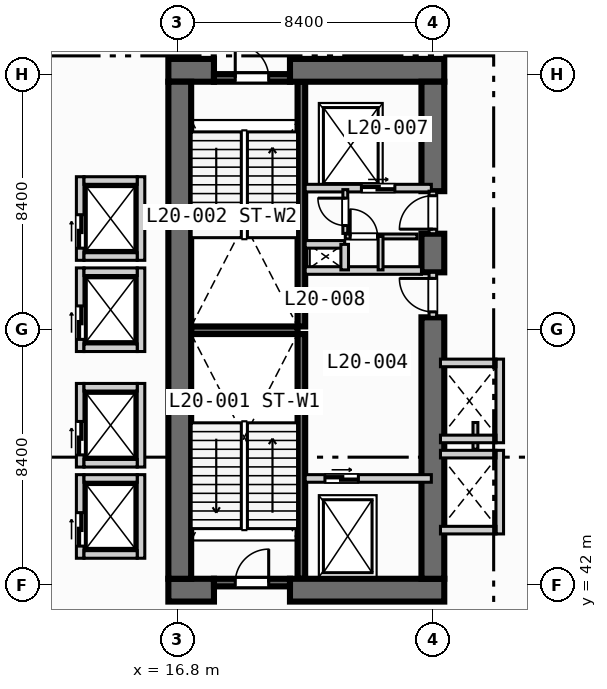
"""IFC4 building model, lengths in metres.
Left out: names, types, materials, properties, quantities, classifications, styles, units other than length and angle.
Written with IfcOpenShell. Run it as: python <this file> out.ifc"""

import sys

from ifc_helpers import new_model, si_unit, direction, frame, frame_2d, origin, place, context, subcontext, project, spatial, rectangle, extrude, element, fill, save


model = new_model("IFC4")
c1 = context("Model", 3, precision=1e-05, world=origin(), true_north=direction((0.0, 1.0)))
c2 = subcontext(c1, "Body", "Model", "MODEL_VIEW")
j1 = project(units=[si_unit("LENGTHUNIT", "METRE"), si_unit("PLANEANGLEUNIT", "RADIAN")], contexts=[c1])
p1 = place(None, origin())
s1 = spatial("IfcSite", under=j1, at=p1, CompositionType="ELEMENT")
p2 = place(p1, origin())
s2 = spatial("IfcBuilding", under=s1, at=p2, CompositionType="ELEMENT")
p3 = place(p2, frame((0.0, 0.0, 85.2)))
s3 = spatial("IfcBuildingStorey", under=s2, at=p3, CompositionType="ELEMENT", Elevation=85.2)
for number, where, z_axis, x_axis in (
    (1, (20.875, 42.2, 0.0), (0.0, 0.0, 1.0), (0.0, 1.0, 0.0)),
    (2, (20.875, 50.5, 0.0), (0.0, 0.0, 1.0), (0.0, 1.0, 0.0)),
):
    element("IfcWall", number, at=place(p3, frame(where, z_axis=z_axis, x_axis=x_axis)), inside=s3, PredefinedType="SOLIDWALL", context=c2, shape_type="SweptSolid", body=[
        extrude(rectangle(XDim=8.05, YDim=0.25, at=frame_2d((4.025, 0.0))), origin(), (0.0, 0.0, 1.0), 4.15),
    ])
p4 = place(p3, frame((17.25, 50.375, 0.0), z_axis=(0.0, 0.0, 1.0), x_axis=(1.0, 0.0, 0.0)))
e3 = element("IfcWall", 3, at=p4, inside=s3, PredefinedType="SOLIDWALL", context=c2, shape_type="SweptSolid", body=[
    extrude(rectangle(XDim=3.5, YDim=0.25, at=frame_2d((1.75, 0.0))), origin(), (0.0, 0.0, 1.0), 4.15),
])
p5 = place(p3, frame((16.5, 41.825, 0.0), z_axis=(0.0, 0.0, 1.0), x_axis=(1.0, 0.0, 0.0)))
e4 = element("IfcWall", 4, at=p5, inside=s3, PredefinedType="SHEAR", context=c2, shape_type="SweptSolid", body=[
    extrude(rectangle(XDim=1.5, YDim=0.75, at=frame_2d((0.75, 0.0))), origin(), (0.0, 0.0, 1.0), 4.15),
])
p6 = place(p3, frame((20.5, 41.825, 0.0), z_axis=(0.0, 0.0, 1.0), x_axis=(1.0, 0.0, 0.0)))
e5 = element("IfcWall", 5, at=p6, inside=s3, PredefinedType="SHEAR", context=c2, shape_type="SweptSolid", body=[
    extrude(rectangle(XDim=5.075, YDim=0.75, at=frame_2d((2.538, 0.0))), origin(), (0.0, 0.0, 1.0), 4.15),
])
p7 = place(p3, frame((16.5, 58.925, 0.0), z_axis=(0.0, 0.0, 1.0), x_axis=(1.0, 0.0, 0.0)))
e6 = element("IfcWall", 6, at=p7, inside=s3, PredefinedType="SHEAR", context=c2, shape_type="SweptSolid", body=[
    extrude(rectangle(XDim=1.5, YDim=0.75, at=frame_2d((0.75, 0.0))), origin(), (0.0, 0.0, 1.0), 4.15),
])
p8 = place(p3, frame((20.5, 58.925, 0.0), z_axis=(0.0, 0.0, 1.0), x_axis=(1.0, 0.0, 0.0)))
e7 = element("IfcWall", 7, at=p8, inside=s3, PredefinedType="SHEAR", context=c2, shape_type="SweptSolid", body=[
    extrude(rectangle(XDim=5.075, YDim=0.75, at=frame_2d((2.538, 0.0))), origin(), (0.0, 0.0, 1.0), 4.15),
])
p9 = place(p3, frame((16.875, 42.2, 0.0), z_axis=(0.0, 0.0, 1.0), x_axis=(0.0, 1.0, 0.0)))
e8 = element("IfcWall", 8, at=p9, inside=s3, PredefinedType="SHEAR", context=c2, shape_type="SweptSolid", body=[
    extrude(rectangle(XDim=16.35, YDim=0.75, at=frame_2d((8.175, 0.0))), origin(), (0.0, 0.0, 1.0), 4.15),
])
p10 = place(p3, frame((25.2, 42.2, 0.0), z_axis=(0.0, 0.0, 1.0), x_axis=(0.0, 1.0, 0.0)))
e9 = element("IfcWall", 9, at=p10, inside=s3, PredefinedType="SHEAR", context=c2, shape_type="SweptSolid", body=[
    extrude(rectangle(XDim=8.6, YDim=0.75, at=frame_2d((4.3, 0.0))), origin(), (0.0, 0.0, 1.0), 4.15),
])
p11 = place(p3, frame((25.2, 52.28, 0.0), z_axis=(0.0, 0.0, 1.0), x_axis=(0.0, 1.0, 0.0)))
e10 = element("IfcWall", 10, at=p11, inside=s3, PredefinedType="SHEAR", context=c2, shape_type="SweptSolid", body=[
    extrude(rectangle(XDim=1.27, YDim=0.75, at=frame_2d((0.635, 0.0))), origin(), (0.0, 0.0, 1.0), 4.15),
])
p12 = place(p3, frame((25.2, 54.95, 0.0), z_axis=(0.0, 0.0, 1.0), x_axis=(0.0, 1.0, 0.0)))
e11 = element("IfcWall", 11, at=p12, inside=s3, PredefinedType="SHEAR", context=c2, shape_type="SweptSolid", body=[
    extrude(rectangle(XDim=3.6, YDim=0.75, at=frame_2d((1.8, 0.0))), origin(), (0.0, 0.0, 1.0), 4.15),
])
p13 = place(p3, frame((18.0, 42.075, 0.0), z_axis=(0.0, 0.0, 1.0), x_axis=(1.0, 0.0, 0.0)))
e12 = element("IfcWall", 12, at=p13, inside=s3, PredefinedType="SOLIDWALL", context=c2, shape_type="SweptSolid", body=[
    extrude(rectangle(XDim=2.5, YDim=0.25, at=frame_2d((1.25, 0.0))), origin(), (0.0, 0.0, 1.0), 4.15),
])
p14 = place(p13, frame((0.7, 0.0, 0.0)))
e13 = element("IfcOpeningElement", 13, at=p14, cuts=e12, PredefinedType="OPENING", context=c2, shape_type="SweptSolid", body=[
    extrude(rectangle(XDim=1.1, YDim=2.15, at=frame_2d((0.55, 1.075))), frame((0.0, 0.135, 0.0), z_axis=(0.0, -1.0, 0.0), x_axis=(1.0, 0.0, 0.0)), (0.0, 0.0, 1.0), 0.27),
])
p15 = place(p3, frame((18.0, 58.675, 0.0), z_axis=(0.0, 0.0, 1.0), x_axis=(1.0, 0.0, 0.0)))
e14 = element("IfcWall", 14, at=p15, inside=s3, PredefinedType="SOLIDWALL", context=c2, shape_type="SweptSolid", body=[
    extrude(rectangle(XDim=2.5, YDim=0.25, at=frame_2d((1.25, 0.0))), origin(), (0.0, 0.0, 1.0), 4.15),
])
p16 = place(p15, frame((0.7, 0.0, 0.0)))
e15 = element("IfcOpeningElement", 15, at=p16, cuts=e14, PredefinedType="OPENING", context=c2, shape_type="SweptSolid", body=[
    extrude(rectangle(XDim=1.1, YDim=2.15, at=frame_2d((0.55, 1.075))), frame((0.0, 0.135, 0.0), z_axis=(0.0, -1.0, 0.0), x_axis=(1.0, 0.0, 0.0)), (0.0, 0.0, 1.0), 0.27),
])
p17 = place(p3, frame((21.0, 45.5, 0.0), z_axis=(0.0, 0.0, 1.0), x_axis=(1.0, 0.0, 0.0)))
e16 = element("IfcWall", 16, at=p17, inside=s3, PredefinedType="SOLIDWALL", context=c2, shape_type="SweptSolid", body=[
    extrude(rectangle(XDim=4.15, YDim=0.25, at=frame_2d((2.075, 0.0))), origin(), (0.0, 0.0, 1.0), 4.15),
])
p18 = place(p17, frame((0.65, 0.0, 0.0)))
e17 = element("IfcOpeningElement", 17, at=p18, cuts=e16, PredefinedType="OPENING", context=c2, shape_type="SweptSolid", body=[
    extrude(rectangle(XDim=1.1, YDim=2.15, at=frame_2d((0.55, 1.075))), frame((0.0, 0.135, 0.0), z_axis=(0.0, -1.0, 0.0), x_axis=(1.0, 0.0, 0.0)), (0.0, 0.0, 1.0), 0.27),
])
p19 = place(p3, frame((25.2, 50.8, 0.0), z_axis=(0.0, 0.0, 1.0), x_axis=(0.0, 1.0, 0.0)))
e18 = element("IfcWall", 18, at=p19, inside=s3, PredefinedType="SOLIDWALL", context=c2, shape_type="SweptSolid", body=[
    extrude(rectangle(XDim=1.48, YDim=0.25, at=frame_2d((0.74, 0.0))), origin(), (0.0, 0.0, 1.0), 4.15),
])
p20 = place(p19, frame((0.18, 0.0, 0.0)))
e19 = element("IfcOpeningElement", 19, at=p20, cuts=e18, PredefinedType="OPENING", context=c2, shape_type="SweptSolid", body=[
    extrude(rectangle(XDim=1.1, YDim=2.15, at=frame_2d((0.55, 1.075))), frame((0.0, 0.135, 0.0), z_axis=(0.0, -1.0, 0.0), x_axis=(1.0, 0.0, 0.0)), (0.0, 0.0, 1.0), 0.27),
])
p21 = place(p3, frame((21.0, 52.34, 0.0), z_axis=(0.0, 0.0, 1.0), x_axis=(1.0, 0.0, 0.0)))
e20 = element("IfcWall", 20, at=p21, inside=s3, PredefinedType="SOLIDWALL", context=c2, shape_type="SweptSolid", body=[
    extrude(rectangle(XDim=3.825, YDim=0.25, at=frame_2d((1.913, 0.0))), origin(), (0.0, 0.0, 1.0), 4.15),
])
p22 = place(p3, frame((21.0, 55.05, 0.0), z_axis=(0.0, 0.0, 1.0), x_axis=(1.0, 0.0, 0.0)))
e21 = element("IfcWall", 21, at=p22, inside=s3, PredefinedType="SOLIDWALL", context=c2, shape_type="SweptSolid", body=[
    extrude(rectangle(XDim=4.15, YDim=0.25, at=frame_2d((2.075, 0.0))), origin(), (0.0, 0.0, 1.0), 4.15),
])
p23 = place(p22, frame((1.85, 0.0, 0.0)))
e22 = element("IfcOpeningElement", 22, at=p23, cuts=e21, PredefinedType="OPENING", context=c2, shape_type="SweptSolid", body=[
    extrude(rectangle(XDim=1.1, YDim=2.15, at=frame_2d((0.55, 1.075))), frame((0.0, 0.135, 0.0), z_axis=(0.0, -1.0, 0.0), x_axis=(1.0, 0.0, 0.0)), (0.0, 0.0, 1.0), 0.27),
])
p24 = place(p3, frame((25.2, 53.55, 0.0), z_axis=(0.0, 0.0, 1.0), x_axis=(0.0, 1.0, 0.0)))
e23 = element("IfcWall", 23, at=p24, inside=s3, PredefinedType="SOLIDWALL", context=c2, shape_type="SweptSolid", body=[
    extrude(rectangle(XDim=1.4, YDim=0.25, at=frame_2d((0.7, 0.0))), origin(), (0.0, 0.0, 1.0), 4.15),
])
p25 = place(p24, frame((0.15, 0.0, 0.0)))
e24 = element("IfcOpeningElement", 24, at=p25, cuts=e23, PredefinedType="OPENING", context=c2, shape_type="SweptSolid", body=[
    extrude(rectangle(XDim=1.1, YDim=2.15, at=frame_2d((0.55, 1.075))), frame((0.0, 0.135, 0.0), z_axis=(0.0, -1.0, 0.0), x_axis=(1.0, 0.0, 0.0)), (0.0, 0.0, 1.0), 0.27),
])
p26 = place(p3, frame((21.0, 53.2, 0.0), z_axis=(0.0, 0.0, 1.0), x_axis=(1.0, 0.0, 0.0)))
e25 = element("IfcWall", 25, at=p26, inside=s3, PredefinedType="SOLIDWALL", context=c2, shape_type="SweptSolid", body=[
    extrude(rectangle(XDim=1.3, YDim=0.25, at=frame_2d((0.65, 0.0))), origin(), (0.0, 0.0, 1.0), 4.15),
])
p27 = place(p3, frame((22.3, 52.36, 0.0), z_axis=(0.0, 0.0, 1.0), x_axis=(0.0, 1.0, 0.0)))
e26 = element("IfcWall", 26, at=p27, inside=s3, PredefinedType="SOLIDWALL", context=c2, shape_type="SweptSolid", body=[
    extrude(rectangle(XDim=0.84, YDim=0.25, at=frame_2d((0.42, 0.0))), origin(), (0.0, 0.0, 1.0), 4.15),
])
p28 = place(p3, frame((22.32, 53.56, 0.0), z_axis=(0.0, 0.0, 1.0), x_axis=(0.0, 1.0, 0.0)))
e27 = element("IfcWall", 27, at=p28, inside=s3, PredefinedType="PARTITIONING", context=c2, shape_type="SweptSolid", body=[
    extrude(rectangle(XDim=1.44, YDim=0.16, at=frame_2d((0.72, 0.0))), origin(), (0.0, 0.0, 1.0), 4.15),
])
p29 = place(p28, frame((0.26, 0.0, 0.0)))
e28 = element("IfcOpeningElement", 28, at=p29, cuts=e27, PredefinedType="OPENING", context=c2, shape_type="SweptSolid", body=[
    extrude(rectangle(XDim=0.9, YDim=2.1, at=frame_2d((0.45, 1.05))), frame((0.0, 0.09, 0.0), z_axis=(0.0, -1.0, 0.0), x_axis=(1.0, 0.0, 0.0)), (0.0, 0.0, 1.0), 0.18),
])
p30 = place(p3, frame((22.32, 53.46, 0.0), z_axis=(0.0, 0.0, 1.0), x_axis=(1.0, 0.0, 0.0)))
e29 = element("IfcWall", 29, at=p30, inside=s3, PredefinedType="PARTITIONING", context=c2, shape_type="SweptSolid", body=[
    extrude(rectangle(XDim=2.36, YDim=0.16, at=frame_2d((1.18, 0.0))), origin(), (0.0, 0.0, 1.0), 4.15),
])
p31 = place(p30, frame((0.16, 0.0, 0.0)))
e30 = element("IfcOpeningElement", 30, at=p31, cuts=e29, PredefinedType="OPENING", context=c2, shape_type="SweptSolid", body=[
    extrude(rectangle(XDim=0.9, YDim=2.1, at=frame_2d((0.45, 1.05))), frame((0.0, 0.09, 0.0), z_axis=(0.0, -1.0, 0.0), x_axis=(1.0, 0.0, 0.0)), (0.0, 0.0, 1.0), 0.18),
])
p32 = place(p3, frame((23.48, 52.36, 0.0), z_axis=(0.0, 0.0, 1.0), x_axis=(0.0, 1.0, 0.0)))
e31 = element("IfcWall", 31, at=p32, inside=s3, PredefinedType="PARTITIONING", context=c2, shape_type="SweptSolid", body=[
    extrude(rectangle(XDim=1.1, YDim=0.16, at=frame_2d((0.55, 0.0))), origin(), (0.0, 0.0, 1.0), 4.15),
])
p33 = place(p3, frame((13.6, 42.875, 0.0), z_axis=(0.0, 0.0, 1.0), x_axis=(0.0, 1.0, 0.0)))
e32 = element("IfcWall", 32, at=p33, inside=s3, PredefinedType="SOLIDWALL", context=c2, shape_type="SweptSolid", body=[
    extrude(rectangle(XDim=2.75, YDim=0.25, at=frame_2d((1.375, 0.0))), origin(), (0.0, 0.0, 1.0), 4.15),
])
p34 = place(p33, frame((0.4, 0.0, 0.0)))
e33 = element("IfcOpeningElement", 33, at=p34, cuts=e32, PredefinedType="OPENING", context=c2, shape_type="SweptSolid", body=[
    extrude(rectangle(XDim=1.1, YDim=2.15, at=frame_2d((0.55, 1.075))), frame((0.0, 0.135, 0.0), z_axis=(0.0, -1.0, 0.0), x_axis=(1.0, 0.0, 0.0)), (0.0, 0.0, 1.0), 0.27),
])
p35 = place(p3, frame((15.6, 42.875, 0.0), z_axis=(0.0, 0.0, 1.0), x_axis=(0.0, 1.0, 0.0)))
e34 = element("IfcWall", 34, at=p35, inside=s3, PredefinedType="SOLIDWALL", context=c2, shape_type="SweptSolid", body=[
    extrude(rectangle(XDim=2.75, YDim=0.25, at=frame_2d((1.375, 0.0))), origin(), (0.0, 0.0, 1.0), 4.15),
])
for number, where, z_axis, x_axis in (
    (35, (13.725, 43.0, 0.0), (0.0, 0.0, 1.0), (1.0, 0.0, 0.0)),
    (36, (13.725, 45.5, 0.0), (0.0, 0.0, 1.0), (1.0, 0.0, 0.0)),
):
    element("IfcWall", number, at=place(p3, frame(where, z_axis=z_axis, x_axis=x_axis)), inside=s3, PredefinedType="SOLIDWALL", context=c2, shape_type="SweptSolid", body=[
        extrude(rectangle(XDim=1.75, YDim=0.25, at=frame_2d((0.875, 0.0))), origin(), (0.0, 0.0, 1.0), 4.15),
    ])
p36 = place(p3, frame((13.6, 45.875, 0.0), z_axis=(0.0, 0.0, 1.0), x_axis=(0.0, 1.0, 0.0)))
e37 = element("IfcWall", 37, at=p36, inside=s3, PredefinedType="SOLIDWALL", context=c2, shape_type="SweptSolid", body=[
    extrude(rectangle(XDim=2.75, YDim=0.25, at=frame_2d((1.375, 0.0))), origin(), (0.0, 0.0, 1.0), 4.15),
])
p37 = place(p36, frame((0.4, 0.0, 0.0)))
e38 = element("IfcOpeningElement", 38, at=p37, cuts=e37, PredefinedType="OPENING", context=c2, shape_type="SweptSolid", body=[
    extrude(rectangle(XDim=1.1, YDim=2.15, at=frame_2d((0.55, 1.075))), frame((0.0, 0.135, 0.0), z_axis=(0.0, -1.0, 0.0), x_axis=(1.0, 0.0, 0.0)), (0.0, 0.0, 1.0), 0.27),
])
p38 = place(p3, frame((15.6, 45.875, 0.0), z_axis=(0.0, 0.0, 1.0), x_axis=(0.0, 1.0, 0.0)))
e39 = element("IfcWall", 39, at=p38, inside=s3, PredefinedType="SOLIDWALL", context=c2, shape_type="SweptSolid", body=[
    extrude(rectangle(XDim=2.75, YDim=0.25, at=frame_2d((1.375, 0.0))), origin(), (0.0, 0.0, 1.0), 4.15),
])
for number, where, z_axis, x_axis in (
    (40, (13.725, 46.0, 0.0), (0.0, 0.0, 1.0), (1.0, 0.0, 0.0)),
    (41, (13.725, 48.5, 0.0), (0.0, 0.0, 1.0), (1.0, 0.0, 0.0)),
):
    element("IfcWall", number, at=place(p3, frame(where, z_axis=z_axis, x_axis=x_axis)), inside=s3, PredefinedType="SOLIDWALL", context=c2, shape_type="SweptSolid", body=[
        extrude(rectangle(XDim=1.75, YDim=0.25, at=frame_2d((0.875, 0.0))), origin(), (0.0, 0.0, 1.0), 4.15),
    ])
p39 = place(p3, frame((13.6, 49.675, 0.0), z_axis=(0.0, 0.0, 1.0), x_axis=(0.0, 1.0, 0.0)))
e42 = element("IfcWall", 42, at=p39, inside=s3, PredefinedType="SOLIDWALL", context=c2, shape_type="SweptSolid", body=[
    extrude(rectangle(XDim=2.75, YDim=0.25, at=frame_2d((1.375, 0.0))), origin(), (0.0, 0.0, 1.0), 4.15),
])
p40 = place(p39, frame((0.4, 0.0, 0.0)))
e43 = element("IfcOpeningElement", 43, at=p40, cuts=e42, PredefinedType="OPENING", context=c2, shape_type="SweptSolid", body=[
    extrude(rectangle(XDim=1.1, YDim=2.15, at=frame_2d((0.55, 1.075))), frame((0.0, 0.135, 0.0), z_axis=(0.0, -1.0, 0.0), x_axis=(1.0, 0.0, 0.0)), (0.0, 0.0, 1.0), 0.27),
])
p41 = place(p3, frame((15.6, 49.675, 0.0), z_axis=(0.0, 0.0, 1.0), x_axis=(0.0, 1.0, 0.0)))
e44 = element("IfcWall", 44, at=p41, inside=s3, PredefinedType="SOLIDWALL", context=c2, shape_type="SweptSolid", body=[
    extrude(rectangle(XDim=2.75, YDim=0.25, at=frame_2d((1.375, 0.0))), origin(), (0.0, 0.0, 1.0), 4.15),
])
for number, where, z_axis, x_axis in (
    (45, (13.725, 49.8, 0.0), (0.0, 0.0, 1.0), (1.0, 0.0, 0.0)),
    (46, (13.725, 52.3, 0.0), (0.0, 0.0, 1.0), (1.0, 0.0, 0.0)),
):
    element("IfcWall", number, at=place(p3, frame(where, z_axis=z_axis, x_axis=x_axis)), inside=s3, PredefinedType="SOLIDWALL", context=c2, shape_type="SweptSolid", body=[
        extrude(rectangle(XDim=1.75, YDim=0.25, at=frame_2d((0.875, 0.0))), origin(), (0.0, 0.0, 1.0), 4.15),
    ])
p42 = place(p3, frame((13.6, 52.675, 0.0), z_axis=(0.0, 0.0, 1.0), x_axis=(0.0, 1.0, 0.0)))
e47 = element("IfcWall", 47, at=p42, inside=s3, PredefinedType="SOLIDWALL", context=c2, shape_type="SweptSolid", body=[
    extrude(rectangle(XDim=2.75, YDim=0.25, at=frame_2d((1.375, 0.0))), origin(), (0.0, 0.0, 1.0), 4.15),
])
p43 = place(p42, frame((0.4, 0.0, 0.0)))
e48 = element("IfcOpeningElement", 48, at=p43, cuts=e47, PredefinedType="OPENING", context=c2, shape_type="SweptSolid", body=[
    extrude(rectangle(XDim=1.1, YDim=2.15, at=frame_2d((0.55, 1.075))), frame((0.0, 0.135, 0.0), z_axis=(0.0, -1.0, 0.0), x_axis=(1.0, 0.0, 0.0)), (0.0, 0.0, 1.0), 0.27),
])
p44 = place(p3, frame((15.6, 52.675, 0.0), z_axis=(0.0, 0.0, 1.0), x_axis=(0.0, 1.0, 0.0)))
e49 = element("IfcWall", 49, at=p44, inside=s3, PredefinedType="SOLIDWALL", context=c2, shape_type="SweptSolid", body=[
    extrude(rectangle(XDim=2.75, YDim=0.25, at=frame_2d((1.375, 0.0))), origin(), (0.0, 0.0, 1.0), 4.15),
])
for number, where, z_axis, x_axis in (
    (50, (13.725, 52.8, 0.0), (0.0, 0.0, 1.0), (1.0, 0.0, 0.0)),
    (51, (13.725, 55.3, 0.0), (0.0, 0.0, 1.0), (1.0, 0.0, 0.0)),
):
    element("IfcWall", number, at=place(p3, frame(where, z_axis=z_axis, x_axis=x_axis)), inside=s3, PredefinedType="SOLIDWALL", context=c2, shape_type="SweptSolid", body=[
        extrude(rectangle(XDim=1.75, YDim=0.25, at=frame_2d((0.875, 0.0))), origin(), (0.0, 0.0, 1.0), 4.15),
    ])
p45 = place(p3, frame((27.4, 43.675, 0.0), z_axis=(0.0, 0.0, 1.0), x_axis=(0.0, 1.0, 0.0)))
e52 = element("IfcWall", 52, at=p45, inside=s3, PredefinedType="SOLIDWALL", context=c2, shape_type="SweptSolid", body=[
    extrude(rectangle(XDim=2.75, YDim=0.25, at=frame_2d((1.375, 0.0))), origin(), (0.0, 0.0, 1.0), 4.15),
])
for number, where, z_axis, x_axis in (
    (53, (25.45, 43.8, 0.0), (0.0, 0.0, 1.0), (1.0, 0.0, 0.0)),
    (54, (25.45, 46.3, 0.0), (0.0, 0.0, 1.0), (1.0, 0.0, 0.0)),
):
    element("IfcWall", number, at=place(p3, frame(where, z_axis=z_axis, x_axis=x_axis)), inside=s3, PredefinedType="SOLIDWALL", context=c2, shape_type="SweptSolid", body=[
        extrude(rectangle(XDim=1.825, YDim=0.25, at=frame_2d((0.913, 0.0))), origin(), (0.0, 0.0, 1.0), 4.15),
    ])
p46 = place(p3, frame((26.6, 46.46, 0.0), z_axis=(0.0, 0.0, 1.0), x_axis=(0.0, 1.0, 0.0)))
e55 = element("IfcWall", 55, at=p46, inside=s3, PredefinedType="PARTITIONING", context=c2, shape_type="SweptSolid", body=[
    extrude(rectangle(XDim=0.88, YDim=0.16, at=frame_2d((0.44, 0.0))), origin(), (0.0, 0.0, 1.0), 4.15),
])
p47 = place(p3, frame((27.4, 46.675, 0.0), z_axis=(0.0, 0.0, 1.0), x_axis=(0.0, 1.0, 0.0)))
e56 = element("IfcWall", 56, at=p47, inside=s3, PredefinedType="SOLIDWALL", context=c2, shape_type="SweptSolid", body=[
    extrude(rectangle(XDim=2.75, YDim=0.25, at=frame_2d((1.375, 0.0))), origin(), (0.0, 0.0, 1.0), 4.15),
])
for number, where, z_axis, x_axis in (
    (57, (25.45, 46.8, 0.0), (0.0, 0.0, 1.0), (1.0, 0.0, 0.0)),
    (58, (25.45, 49.3, 0.0), (0.0, 0.0, 1.0), (1.0, 0.0, 0.0)),
):
    element("IfcWall", number, at=place(p3, frame(where, z_axis=z_axis, x_axis=x_axis)), inside=s3, PredefinedType="SOLIDWALL", context=c2, shape_type="SweptSolid", body=[
        extrude(rectangle(XDim=1.825, YDim=0.25, at=frame_2d((0.913, 0.0))), origin(), (0.0, 0.0, 1.0), 4.15),
    ])
p48 = place(p14, origin())
e59 = element("IfcDoor", 59, at=p48, inside=s3, OperationType="SINGLE_SWING_RIGHT", PredefinedType="DOOR", context=c2, shape_type="SweptSolid", body=[
    extrude(rectangle(XDim=1.1, YDim=2.15, at=frame_2d((0.55, 1.075))), frame((0.0, 0.025, 0.0), z_axis=(0.0, -1.0, 0.0), x_axis=(1.0, 0.0, 0.0)), (0.0, 0.0, 1.0), 0.05),
])
fill(e13, e59)
p49 = place(p16, origin())
e60 = element("IfcDoor", 60, at=p49, inside=s3, OperationType="SINGLE_SWING_LEFT", PredefinedType="DOOR", context=c2, shape_type="SweptSolid", body=[
    extrude(rectangle(XDim=1.1, YDim=2.15, at=frame_2d((0.55, 1.075))), frame((0.0, 0.025, 0.0), z_axis=(0.0, -1.0, 0.0), x_axis=(1.0, 0.0, 0.0)), (0.0, 0.0, 1.0), 0.05),
])
fill(e15, e60)
p50 = place(p18, origin())
e61 = element("IfcDoor", 61, at=p50, inside=s3, OperationType="SLIDING_TO_LEFT", PredefinedType="DOOR", context=c2, shape_type="SweptSolid", body=[
    extrude(rectangle(XDim=1.1, YDim=2.15, at=frame_2d((0.55, 1.075))), frame((0.0, 0.025, 0.0), z_axis=(0.0, -1.0, 0.0), x_axis=(1.0, 0.0, 0.0)), (0.0, 0.0, 1.0), 0.05),
])
fill(e17, e61)
p51 = place(p20, origin())
e62 = element("IfcDoor", 62, at=p51, inside=s3, OperationType="SINGLE_SWING_RIGHT", PredefinedType="DOOR", context=c2, shape_type="SweptSolid", body=[
    extrude(rectangle(XDim=1.1, YDim=2.15, at=frame_2d((0.55, 1.075))), frame((0.0, 0.025, 0.0), z_axis=(0.0, -1.0, 0.0), x_axis=(1.0, 0.0, 0.0)), (0.0, 0.0, 1.0), 0.05),
])
fill(e19, e62)
p52 = place(p23, origin())
e63 = element("IfcDoor", 63, at=p52, inside=s3, OperationType="SLIDING_TO_LEFT", PredefinedType="DOOR", context=c2, shape_type="SweptSolid", body=[
    extrude(rectangle(XDim=1.1, YDim=2.15, at=frame_2d((0.55, 1.075))), frame((0.0, 0.025, 0.0), z_axis=(0.0, -1.0, 0.0), x_axis=(1.0, 0.0, 0.0)), (0.0, 0.0, 1.0), 0.05),
])
fill(e22, e63)
p53 = place(p25, origin())
e64 = element("IfcDoor", 64, at=p53, inside=s3, OperationType="SINGLE_SWING_LEFT", PredefinedType="DOOR", context=c2, shape_type="SweptSolid", body=[
    extrude(rectangle(XDim=1.1, YDim=2.15, at=frame_2d((0.55, 1.075))), frame((0.0, 0.025, 0.0), z_axis=(0.0, -1.0, 0.0), x_axis=(1.0, 0.0, 0.0)), (0.0, 0.0, 1.0), 0.05),
])
fill(e24, e64)
p54 = place(p29, origin())
e65 = element("IfcDoor", 65, at=p54, inside=s3, OperationType="SINGLE_SWING_RIGHT", PredefinedType="DOOR", context=c2, shape_type="SweptSolid", body=[
    extrude(rectangle(XDim=0.9, YDim=2.1, at=frame_2d((0.45, 1.05))), frame((0.0, 0.025, 0.0), z_axis=(0.0, -1.0, 0.0), x_axis=(1.0, 0.0, 0.0)), (0.0, 0.0, 1.0), 0.05),
])
fill(e28, e65)
p55 = place(p31, origin())
e66 = element("IfcDoor", 66, at=p55, inside=s3, OperationType="SINGLE_SWING_LEFT", PredefinedType="DOOR", context=c2, shape_type="SweptSolid", body=[
    extrude(rectangle(XDim=0.9, YDim=2.1, at=frame_2d((0.45, 1.05))), frame((0.0, 0.025, 0.0), z_axis=(0.0, -1.0, 0.0), x_axis=(1.0, 0.0, 0.0)), (0.0, 0.0, 1.0), 0.05),
])
fill(e30, e66)
p56 = place(p34, origin())
e67 = element("IfcDoor", 67, at=p56, inside=s3, OperationType="SLIDING_TO_LEFT", PredefinedType="DOOR", context=c2, shape_type="SweptSolid", body=[
    extrude(rectangle(XDim=1.1, YDim=2.15, at=frame_2d((0.55, 1.075))), frame((0.0, 0.025, 0.0), z_axis=(0.0, -1.0, 0.0), x_axis=(1.0, 0.0, 0.0)), (0.0, 0.0, 1.0), 0.05),
])
fill(e33, e67)
p57 = place(p37, origin())
e68 = element("IfcDoor", 68, at=p57, inside=s3, OperationType="SLIDING_TO_LEFT", PredefinedType="DOOR", context=c2, shape_type="SweptSolid", body=[
    extrude(rectangle(XDim=1.1, YDim=2.15, at=frame_2d((0.55, 1.075))), frame((0.0, 0.025, 0.0), z_axis=(0.0, -1.0, 0.0), x_axis=(1.0, 0.0, 0.0)), (0.0, 0.0, 1.0), 0.05),
])
fill(e38, e68)
p58 = place(p40, origin())
e69 = element("IfcDoor", 69, at=p58, inside=s3, OperationType="SLIDING_TO_LEFT", PredefinedType="DOOR", context=c2, shape_type="SweptSolid", body=[
    extrude(rectangle(XDim=1.1, YDim=2.15, at=frame_2d((0.55, 1.075))), frame((0.0, 0.025, 0.0), z_axis=(0.0, -1.0, 0.0), x_axis=(1.0, 0.0, 0.0)), (0.0, 0.0, 1.0), 0.05),
])
fill(e43, e69)
p59 = place(p43, origin())
e70 = element("IfcDoor", 70, at=p59, inside=s3, OperationType="SLIDING_TO_LEFT", PredefinedType="DOOR", context=c2, shape_type="SweptSolid", body=[
    extrude(rectangle(XDim=1.1, YDim=2.15, at=frame_2d((0.55, 1.075))), frame((0.0, 0.025, 0.0), z_axis=(0.0, -1.0, 0.0), x_axis=(1.0, 0.0, 0.0)), (0.0, 0.0, 1.0), 0.05),
])
fill(e48, e70)
save(model, sys.argv[1])
